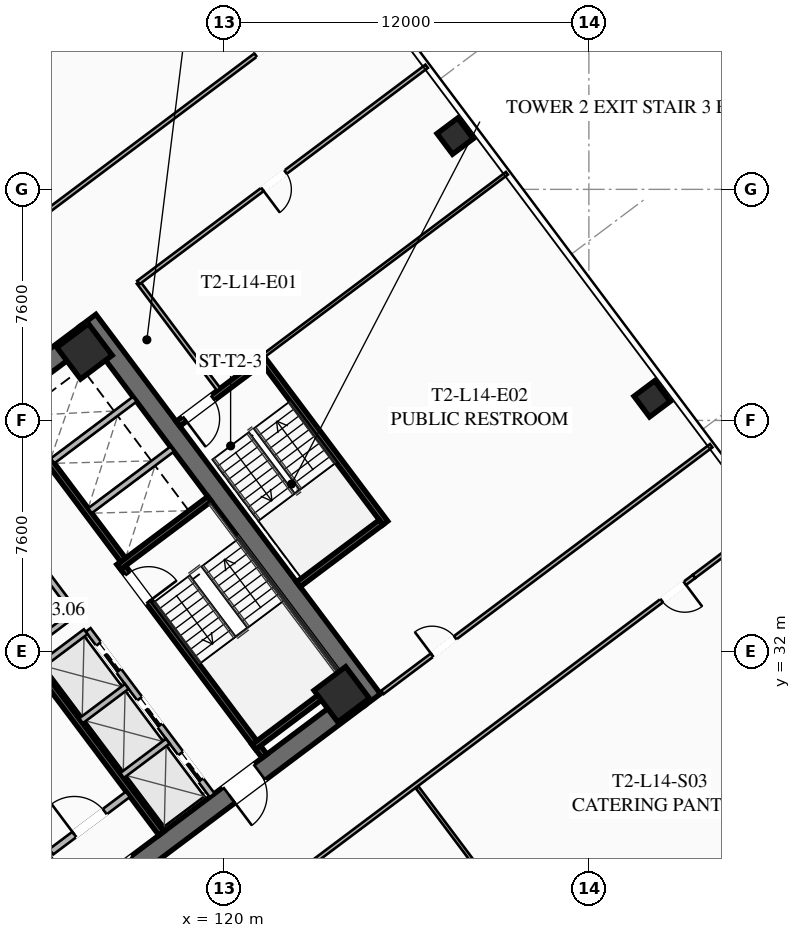
"""IFC4 building model, lengths in metres.
Left out: names, types, materials, properties, quantities, classifications, styles, units other than length and angle.
Written with IfcOpenShell. Run it as: python <this file> out.ifc"""

import sys

from ifc_helpers import new_model, si_unit, direction, frame, frame_2d, origin, origin_2d, place, context, subcontext, project, spatial, rectangle, hollow_rectangle, extrude, element, fill, save


model = new_model("IFC4")
c1 = context("Model", 3, precision=1e-05, world=origin(), true_north=direction((0.0, 1.0)))
c2 = subcontext(c1, "Body", "Model", "MODEL_VIEW")
j1 = project(units=[si_unit("LENGTHUNIT", "METRE"), si_unit("PLANEANGLEUNIT", "RADIAN")], contexts=[c1])
p1 = place(None, origin())
s1 = spatial("IfcSite", under=j1, at=p1, CompositionType="ELEMENT")
p2 = place(p1, origin())
s2 = spatial("IfcBuilding", under=s1, at=p2, CompositionType="ELEMENT")
p3 = place(p2, frame((0.0, 0.0, 56.55)))
s3 = spatial("IfcBuildingStorey", under=s2, at=p3, CompositionType="ELEMENT", Elevation=56.55)
p4 = place(p3, frame((115.524, 42.893, 0.0), z_axis=(0.0, 0.0, 1.0), x_axis=(0.600005007985, -0.799996243986, 0.0)))
e1 = element("IfcWall", 1, at=p4, inside=s3, PredefinedType="SHEAR", context=c2, shape_type="SweptSolid", body=[
    extrude(rectangle(XDim=15.6, YDim=0.65, at=frame_2d((7.8, 0.0))), origin(), (0.0, 0.0, 1.0), 3.55),
])
p5 = place(p3, frame((124.429, 30.478, 0.0), z_axis=(0.0, 0.0, 1.0), x_axis=(-0.799998028465, -0.600002628705, 0.0)))
e2 = element("IfcWall", 2, at=p5, inside=s3, PredefinedType="SHEAR", context=c2, shape_type="SweptSolid", body=[
    extrude(rectangle(XDim=14.86, YDim=0.65, at=frame_2d((7.43, 0.0))), origin(), (0.0, 0.0, 1.0), 3.55),
])
p6 = place(p5, frame((9.13, 0.0, 0.0)))
e3 = element("IfcOpeningElement", 3, at=p6, cuts=e2, PredefinedType="OPENING", context=c2, shape_type="SweptSolid", body=[
    extrude(rectangle(XDim=1.25, YDim=2.25, at=frame_2d((0.625, 1.125))), frame((0.0, 0.335, 0.0), z_axis=(0.0, -1.0, 0.0), x_axis=(1.0, 0.0, 0.0)), (0.0, 0.0, 1.0), 0.67),
])
p7 = place(p5, frame((4.08, 0.0, 0.0)))
e4 = element("IfcOpeningElement", 4, at=p7, cuts=e2, PredefinedType="OPENING", context=c2, shape_type="SweptSolid", body=[
    extrude(rectangle(XDim=1.25, YDim=2.25, at=frame_2d((0.625, 1.125))), frame((0.0, 0.335, 0.0), z_axis=(0.0, -1.0, 0.0), x_axis=(1.0, 0.0, 0.0)), (0.0, 0.0, 1.0), 0.67),
])
p8 = place(p3, frame((103.571, 33.522, 0.0), z_axis=(0.0, 0.0, 1.0), x_axis=(0.799998028465, 0.600002628705, 0.0)))
e5 = element("IfcWall", 5, at=p8, inside=s3, PredefinedType="SHEAR", context=c2, shape_type="SweptSolid", body=[
    extrude(rectangle(XDim=14.86, YDim=0.65, at=frame_2d((7.43, 0.0))), origin(), (0.0, 0.0, 1.0), 3.55),
])
p9 = place(p8, frame((4.48, 0.0, 0.0)))
e6 = element("IfcOpeningElement", 6, at=p9, cuts=e5, PredefinedType="OPENING", context=c2, shape_type="SweptSolid", body=[
    extrude(rectangle(XDim=1.25, YDim=2.25, at=frame_2d((0.625, 1.125))), frame((0.0, 0.335, 0.0), z_axis=(0.0, -1.0, 0.0), x_axis=(1.0, 0.0, 0.0)), (0.0, 0.0, 1.0), 0.67),
])
p10 = place(p8, frame((9.53, 0.0, 0.0)))
e7 = element("IfcOpeningElement", 7, at=p10, cuts=e5, PredefinedType="OPENING", context=c2, shape_type="SweptSolid", body=[
    extrude(rectangle(XDim=1.25, YDim=2.25, at=frame_2d((0.625, 1.125))), frame((0.0, 0.335, 0.0), z_axis=(0.0, -1.0, 0.0), x_axis=(1.0, 0.0, 0.0)), (0.0, 0.0, 1.0), 0.67),
])
for number, where, z_axis, x_axis in (
    (8, (123.87, 30.59, 0.0), (0.0, 0.0, 1.0), (0.8, 0.6, 0.0)),
    (9, (115.41, 41.87, 0.0), (0.0, 0.0, 1.0), (0.8, 0.6, 0.0)),
):
    element("IfcColumn", number, at=place(p3, frame(where, z_axis=z_axis, x_axis=x_axis)), inside=s3, PredefinedType="COLUMN", context=c2, shape_type="SweptSolid", body=[
        extrude(hollow_rectangle(XDim=1.3, YDim=1.3, WallThickness=0.05, at=origin_2d()), origin(), (0.0, 0.0, 1.0), 3.35),
    ])
for number, where, z_axis, x_axis in (
    (10, (134.08, 40.31, 0.0), (0.0, 0.0, 1.0), (0.8, 0.6, 0.0)),
    (11, (127.6, 48.95, 0.0), (0.0, 0.0, 1.0), (0.8, 0.6, 0.0)),
):
    element("IfcColumn", number, at=place(p3, frame(where, z_axis=z_axis, x_axis=x_axis)), inside=s3, PredefinedType="COLUMN", context=c2, shape_type="SweptSolid", body=[
        extrude(hollow_rectangle(XDim=0.85, YDim=0.85, WallThickness=0.035, at=origin_2d()), origin(), (0.0, 0.0, 1.0), 3.35),
    ])
p11 = place(p3, frame((116.56, 34.92, 0.0), z_axis=(0.0, 0.0, 1.0), x_axis=(0.600009827119, -0.799992629566, 0.0)))
e12 = element("IfcWall", 12, at=p11, inside=s3, PredefinedType="SHEAR", context=c2, shape_type="SweptSolid", body=[
    extrude(rectangle(XDim=7.95, YDim=0.2, at=frame_2d((3.975, 0.0))), origin(), (0.0, 0.0, 1.0), 3.35),
])
p12 = place(p11, frame((0.45, 0.0, 0.0)))
e13 = element("IfcOpeningElement", 13, at=p12, cuts=e12, PredefinedType="OPENING", context=c2, shape_type="SweptSolid", body=[
    extrude(rectangle(XDim=1.15, YDim=2.2, at=frame_2d((0.575, 1.1))), frame((0.0, 0.11, 0.0), z_axis=(0.0, -1.0, 0.0), x_axis=(1.0, 0.0, 0.0)), (0.0, 0.0, 1.0), 0.22),
])
for number, where, z_axis, x_axis in (
    (14, (116.54, 34.78, 0.0), (0.0, 0.0, 1.0), (0.8, 0.6, 0.0)),
    (15, (120.98, 28.86, 0.0), (0.0, 0.0, 1.0), (0.8, 0.6, 0.0)),
):
    element("IfcWall", number, at=place(p3, frame(where, z_axis=z_axis, x_axis=x_axis)), inside=s3, PredefinedType="SHEAR", context=c2, shape_type="SweptSolid", body=[
        extrude(rectangle(XDim=3.73, YDim=0.2, at=frame_2d((1.865, 0.0))), origin(), (0.0, 0.0, 1.0), 3.35),
    ])
p13 = place(p3, frame((117.938, 26.016, 0.0), z_axis=(0.0, 0.0, 1.0), x_axis=(-0.600005463273, 0.799995902516, 0.0)))
e16 = element("IfcWall", 16, at=p13, inside=s3, PredefinedType="SHEAR", context=c2, shape_type="SweptSolid", body=[
    extrude(rectangle(XDim=14.3, YDim=0.2, at=frame_2d((7.15, 0.0))), origin(), (0.0, 0.0, 1.0), 3.35),
])
p14 = place(p3, frame((114.316, 25.412, 0.0), z_axis=(0.0, 0.0, 1.0), x_axis=(0.800018601094, 0.59997519774, 0.0)))
e17 = element("IfcWall", 17, at=p14, inside=s3, PredefinedType="SOLIDWALL", context=c2, shape_type="SweptSolid", body=[
    extrude(rectangle(XDim=3.15, YDim=0.22, at=frame_2d((1.575, 0.0))), origin(), (0.0, 0.0, 1.0), 2.703),
])
p15 = place(p14, frame((0.95, 0.0, 0.0)))
e18 = element("IfcOpeningElement", 18, at=p15, cuts=e17, PredefinedType="OPENING", context=c2, shape_type="SweptSolid", body=[
    extrude(rectangle(XDim=1.25, YDim=2.25, at=frame_2d((0.625, 1.125))), frame((0.0, 0.12, 0.0), z_axis=(0.0, -1.0, 0.0), x_axis=(1.0, 0.0, 0.0)), (0.0, 0.0, 1.0), 0.24),
])
p16 = place(p3, frame((115.13, 23.91, 0.0), z_axis=(0.0, 0.0, 1.0), x_axis=(-0.599975393228, 0.800018454488, 0.0)))
e19 = element("IfcWall", 19, at=p16, inside=s3, PredefinedType="SHEAR", context=c2, shape_type="SweptSolid", body=[
    extrude(rectangle(XDim=6.35, YDim=0.2, at=frame_2d((3.175, 0.0))), origin(), (0.0, 0.0, 1.0), 3.35),
])
p17 = place(p16, frame((4.775, 0.0, 0.0)))
e20 = element("IfcOpeningElement", 20, at=p17, cuts=e19, PredefinedType="OPENING", context=c2, shape_type="SweptSolid", body=[
    extrude(rectangle(XDim=1.3, YDim=2.25, at=frame_2d((0.65, 1.125))), frame((0.0, 0.11, 0.0), z_axis=(0.0, -1.0, 0.0), x_axis=(1.0, 0.0, 0.0)), (0.0, 0.0, 1.0), 0.22),
])
p18 = place(p16, frame((2.775, 0.0, 0.0)))
e21 = element("IfcOpeningElement", 21, at=p18, cuts=e19, PredefinedType="OPENING", context=c2, shape_type="SweptSolid", body=[
    extrude(rectangle(XDim=1.3, YDim=2.25, at=frame_2d((0.65, 1.125))), frame((0.0, 0.11, 0.0), z_axis=(0.0, -1.0, 0.0), x_axis=(1.0, 0.0, 0.0)), (0.0, 0.0, 1.0), 0.22),
])
p19 = place(p16, frame((0.575, 0.0, 0.0)))
e22 = element("IfcOpeningElement", 22, at=p19, cuts=e19, PredefinedType="OPENING", context=c2, shape_type="SweptSolid", body=[
    extrude(rectangle(XDim=1.3, YDim=2.25, at=frame_2d((0.65, 1.125))), frame((0.0, 0.11, 0.0), z_axis=(0.0, -1.0, 0.0), x_axis=(1.0, 0.0, 0.0)), (0.0, 0.0, 1.0), 0.22),
])
p20 = place(p3, frame((112.87, 40.09, 0.0), z_axis=(0.0, 0.0, 1.0), x_axis=(0.599975393228, -0.800018454488, 0.0)))
e23 = element("IfcWall", 23, at=p20, inside=s3, PredefinedType="SHEAR", context=c2, shape_type="SweptSolid", body=[
    extrude(rectangle(XDim=6.35, YDim=0.2, at=frame_2d((3.175, 0.0))), origin(), (0.0, 0.0, 1.0), 3.35),
])
for number, where, z_axis, x_axis in (
    (24, (115.59, 36.63, 0.0), (0.0, 0.0, 1.0), (0.8, 0.6, 0.0)),
    (25, (114.36, 38.27, 0.0), (0.0, 0.0, 1.0), (0.8, 0.6, 0.0)),
):
    element("IfcWall", number, at=place(p3, frame(where, z_axis=z_axis, x_axis=x_axis)), inside=s3, PredefinedType="SOLIDWALL", context=c2, shape_type="SweptSolid", body=[
        extrude(rectangle(XDim=3.38, YDim=0.2, at=frame_2d((1.69, 0.0))), origin(), (0.0, 0.0, 1.0), 3.35),
    ])
p21 = place(p3, frame((119.61, 27.27, 0.0), z_axis=(0.0, 0.0, 1.0), x_axis=(-0.600011488909, 0.79999138319, 0.0)))
e26 = element("IfcWall", 26, at=p21, inside=s3, PredefinedType="SOLIDWALL", context=c2, shape_type="SweptSolid", body=[
    extrude(rectangle(XDim=6.8, YDim=0.2, at=frame_2d((3.4, 0.0))), origin(), (0.0, 0.0, 1.0), 3.35),
])
p22 = place(p21, frame((0.625, 0.0, 0.0)))
e27 = element("IfcOpeningElement", 27, at=p22, cuts=e26, PredefinedType="OPENING", context=c2, shape_type="SweptSolid", body=[
    extrude(rectangle(XDim=1.1, YDim=2.2, at=frame_2d((0.55, 1.1))), frame((0.0, 0.11, 0.0), z_axis=(0.0, -1.0, 0.0), x_axis=(1.0, 0.0, 0.0)), (0.0, 0.0, 1.0), 0.22),
])
p23 = place(p21, frame((2.875, 0.0, 0.0)))
e28 = element("IfcOpeningElement", 28, at=p23, cuts=e26, PredefinedType="OPENING", context=c2, shape_type="SweptSolid", body=[
    extrude(rectangle(XDim=1.1, YDim=2.2, at=frame_2d((0.55, 1.1))), frame((0.0, 0.11, 0.0), z_axis=(0.0, -1.0, 0.0), x_axis=(1.0, 0.0, 0.0)), (0.0, 0.0, 1.0), 0.22),
])
p24 = place(p21, frame((5.125, 0.0, 0.0)))
e29 = element("IfcOpeningElement", 29, at=p24, cuts=e26, PredefinedType="OPENING", context=c2, shape_type="SweptSolid", body=[
    extrude(rectangle(XDim=1.1, YDim=2.2, at=frame_2d((0.55, 1.1))), frame((0.0, 0.11, 0.0), z_axis=(0.0, -1.0, 0.0), x_axis=(1.0, 0.0, 0.0)), (0.0, 0.0, 1.0), 0.22),
])
p25 = place(p3, frame((116.646, 27.922, 0.0), z_axis=(0.0, 0.0, 1.0), x_axis=(0.8, 0.6, 0.0)))
e30 = element("IfcWall", 30, at=p25, inside=s3, PredefinedType="SOLIDWALL", context=c2, shape_type="SweptSolid", body=[
    extrude(rectangle(XDim=1.88, YDim=0.2, at=frame_2d((0.94, 0.0))), origin(), (0.0, 0.0, 1.0), 3.35),
])
p26 = place(p3, frame((115.296, 29.722, 0.0), z_axis=(0.0, 0.0, 1.0), x_axis=(0.799984418148, 0.600020775241, 0.0)))
e31 = element("IfcWall", 31, at=p26, inside=s3, PredefinedType="SOLIDWALL", context=c2, shape_type="SweptSolid", body=[
    extrude(rectangle(XDim=1.88, YDim=0.2, at=frame_2d((0.94, 0.0))), origin(), (0.0, 0.0, 1.0), 3.35),
])
p27 = place(p3, frame((113.946, 31.522, 0.0), z_axis=(0.0, 0.0, 1.0), x_axis=(0.8, 0.6, 0.0)))
e32 = element("IfcWall", 32, at=p27, inside=s3, PredefinedType="SOLIDWALL", context=c2, shape_type="SweptSolid", body=[
    extrude(rectangle(XDim=1.88, YDim=0.2, at=frame_2d((0.94, 0.0))), origin(), (0.0, 0.0, 1.0), 3.35),
])
p28 = place(p3, frame((115.11, 33.27, 0.0), z_axis=(0.0, 0.0, 1.0), x_axis=(-0.600011488909, 0.79999138319, 0.0)))
e33 = element("IfcWall", 33, at=p28, inside=s3, PredefinedType="SOLIDWALL", context=c2, shape_type="SweptSolid", body=[
    extrude(rectangle(XDim=6.8, YDim=0.2, at=frame_2d((3.4, 0.0))), origin(), (0.0, 0.0, 1.0), 3.35),
])
p29 = place(p3, frame((113.526, 32.082, 0.0), z_axis=(0.0, 0.0, 1.0), x_axis=(0.800046745961, 0.599937666993, 0.0)))
e34 = element("IfcWall", 34, at=p29, inside=s3, PredefinedType="SOLIDWALL", context=c2, shape_type="SweptSolid", body=[
    extrude(rectangle(XDim=1.88, YDim=0.2, at=frame_2d((0.94, 0.0))), origin(), (0.0, 0.0, 1.0), 3.35),
])
p30 = place(p3, frame((125.304, 36.228, 0.0), z_axis=(0.0, 0.0, 1.0), x_axis=(-0.59998851072, 0.800008616831, 0.0)))
e35 = element("IfcWall", 35, at=p30, inside=s3, PredefinedType="SHEAR", context=c2, shape_type="SweptSolid", body=[
    extrude(rectangle(XDim=6.8, YDim=0.2, at=frame_2d((3.4, 0.0))), origin(), (0.0, 0.0, 1.0), 3.35),
])
p31 = place(p3, frame((121.204, 41.528, 0.0), z_axis=(0.0, 0.0, 1.0), x_axis=(-0.800017232136, -0.599977023131, 0.0)))
e36 = element("IfcWall", 36, at=p31, inside=s3, PredefinedType="SHEAR", context=c2, shape_type="SweptSolid", body=[
    extrude(rectangle(XDim=3.4, YDim=0.2, at=frame_2d((1.7, 0.0))), origin(), (0.0, 0.0, 1.0), 3.35),
])
p32 = place(p31, frame((1.975, 0.0, 0.0)))
e37 = element("IfcOpeningElement", 37, at=p32, cuts=e36, PredefinedType="OPENING", context=c2, shape_type="SweptSolid", body=[
    extrude(rectangle(XDim=1.15, YDim=2.2, at=frame_2d((0.575, 1.1))), frame((0.0, 0.11, 0.0), z_axis=(0.0, -1.0, 0.0), x_axis=(1.0, 0.0, 0.0)), (0.0, 0.0, 1.0), 0.22),
])
p33 = place(p3, frame((122.444, 34.208, 0.0), z_axis=(0.0, 0.0, 1.0), x_axis=(0.79999138319, 0.600011488909, 0.0)))
e38 = element("IfcWall", 38, at=p33, inside=s3, PredefinedType="SHEAR", context=c2, shape_type="SweptSolid", body=[
    extrude(rectangle(XDim=3.4, YDim=0.2, at=frame_2d((1.7, 0.0))), origin(), (0.0, 0.0, 1.0), 3.35),
])
p34 = place(p3, frame((119.824, 40.618, 0.0), z_axis=(0.0, 0.0, 1.0), x_axis=(-0.599982243973, 0.800013316712, 0.0)))
e39 = element("IfcWall", 39, at=p34, inside=s3, PredefinedType="PARTITIONING", context=c2, shape_type="SweptSolid", body=[
    extrude(rectangle(XDim=4.4, YDim=0.135, at=frame_2d((2.2, 0.0))), origin(), (0.0, 0.0, 1.0), 2.703),
])
p35 = place(p3, frame((98.174, 34.468, 0.0), z_axis=(0.0, 0.0, 1.0), x_axis=(0.800000982127, 0.599998690494, 0.0)))
e40 = element("IfcWall", 40, at=p35, inside=s3, PredefinedType="PARTITIONING", context=c2, shape_type="SweptSolid", body=[
    extrude(rectangle(XDim=29.83, YDim=0.135, at=frame_2d((14.915, 0.0))), origin(), (0.0, 0.0, 1.0), 2.703),
])
p36 = place(p35, frame((0.3, 0.0, 0.0)))
e41 = element("IfcOpeningElement", 41, at=p36, cuts=e40, PredefinedType="OPENING", context=c2, shape_type="SweptSolid", body=[
    extrude(rectangle(XDim=0.95, YDim=2.05, at=frame_2d((0.475, 1.025))), frame((0.0, 0.077, 0.0), z_axis=(0.0, -1.0, 0.0), x_axis=(1.0, 0.0, 0.0)), (0.0, 0.0, 1.0), 0.155),
])
p37 = place(p35, frame((10.913, 0.0, 0.0)))
e42 = element("IfcOpeningElement", 42, at=p37, cuts=e40, PredefinedType="OPENING", context=c2, shape_type="SweptSolid", body=[
    extrude(rectangle(XDim=0.95, YDim=2.05, at=frame_2d((0.475, 1.025))), frame((0.0, 0.077, 0.0), z_axis=(0.0, -1.0, 0.0), x_axis=(1.0, 0.0, 0.0)), (0.0, 0.0, 1.0), 0.155),
])
p38 = place(p35, frame((28.58, 0.0, 0.0)))
e43 = element("IfcOpeningElement", 43, at=p38, cuts=e40, PredefinedType="OPENING", context=c2, shape_type="SweptSolid", body=[
    extrude(rectangle(XDim=0.95, YDim=2.05, at=frame_2d((0.475, 1.025))), frame((0.0, 0.077, 0.0), z_axis=(0.0, -1.0, 0.0), x_axis=(1.0, 0.0, 0.0)), (0.0, 0.0, 1.0), 0.155),
])
p39 = place(p3, frame((135.46, 34.47, 0.0), z_axis=(0.0, 0.0, 1.0), x_axis=(-0.800000982127, -0.599998690494, 0.0)))
e44 = element("IfcWall", 44, at=p39, inside=s3, PredefinedType="PARTITIONING", context=c2, shape_type="SweptSolid", body=[
    extrude(rectangle(XDim=29.83, YDim=0.135, at=frame_2d((14.915, 0.0))), origin(), (0.0, 0.0, 1.0), 2.703),
])
p40 = place(p39, frame((28.5, 0.0, 0.0)))
e45 = element("IfcOpeningElement", 45, at=p40, cuts=e44, PredefinedType="OPENING", context=c2, shape_type="SweptSolid", body=[
    extrude(rectangle(XDim=0.95, YDim=2.05, at=frame_2d((0.475, 1.025))), frame((0.0, 0.077, 0.0), z_axis=(0.0, -1.0, 0.0), x_axis=(1.0, 0.0, 0.0)), (0.0, 0.0, 1.0), 0.155),
])
p41 = place(p39, frame((17.938, 0.0, 0.0)))
e46 = element("IfcOpeningElement", 46, at=p41, cuts=e44, PredefinedType="OPENING", context=c2, shape_type="SweptSolid", body=[
    extrude(rectangle(XDim=0.95, YDim=2.05, at=frame_2d((0.475, 1.025))), frame((0.0, 0.077, 0.0), z_axis=(0.0, -1.0, 0.0), x_axis=(1.0, 0.0, 0.0)), (0.0, 0.0, 1.0), 0.155),
])
p42 = place(p39, frame((0.38, 0.0, 0.0)))
e47 = element("IfcOpeningElement", 47, at=p42, cuts=e44, PredefinedType="OPENING", context=c2, shape_type="SweptSolid", body=[
    extrude(rectangle(XDim=0.95, YDim=2.05, at=frame_2d((0.475, 1.025))), frame((0.0, 0.077, 0.0), z_axis=(0.0, -1.0, 0.0), x_axis=(1.0, 0.0, 0.0)), (0.0, 0.0, 1.0), 0.155),
])
p43 = place(p3, frame((135.46, 34.47, 0.0), z_axis=(0.0, 0.0, 1.0), x_axis=(0.799990331366, 0.600012891296, 0.0)))
e48 = element("IfcWall", 48, at=p43, inside=s3, PredefinedType="PARTITIONING", context=c2, shape_type="SweptSolid", body=[
    extrude(rectangle(XDim=3.03, YDim=0.135, at=frame_2d((1.515, 0.0))), origin(), (0.0, 0.0, 1.0), 2.703),
])
p44 = place(p3, frame((132.768, 18.976, 0.0), z_axis=(0.0, 0.0, 1.0), x_axis=(-0.600018253432, 0.799986309601, 0.0)))
e49 = element("IfcWall", 49, at=p44, inside=s3, PredefinedType="PARTITIONING", context=c2, shape_type="SweptSolid", body=[
    extrude(rectangle(XDim=10.7, YDim=0.11, at=frame_2d((5.35, 0.0))), origin(), (0.0, 0.0, 1.0), 2.703),
])
p45 = place(p3, frame((126.664, 51.248, 0.0), z_axis=(0.0, 0.0, 1.0), x_axis=(-0.799995055373, -0.600006592779, 0.0)))
e50 = element("IfcWall", 50, at=p45, inside=s3, PredefinedType="PARTITIONING", context=c2, shape_type="SweptSolid", body=[
    extrude(rectangle(XDim=11.85, YDim=0.135, at=frame_2d((5.925, 0.0))), origin(), (0.0, 0.0, 1.0), 2.703),
])
p46 = place(p45, frame((5.8, 0.0, 0.0)))
e51 = element("IfcOpeningElement", 51, at=p46, cuts=e50, PredefinedType="OPENING", context=c2, shape_type="SweptSolid", body=[
    extrude(rectangle(XDim=0.95, YDim=2.05, at=frame_2d((0.475, 1.025))), frame((0.0, 0.077, 0.0), z_axis=(0.0, -1.0, 0.0), x_axis=(1.0, 0.0, 0.0)), (0.0, 0.0, 1.0), 0.155),
])
p47 = place(p3, frame((125.208, 30.656, 0.0), z_axis=(0.0, 0.0, 1.0), x_axis=(0.799995666112, 0.600005778473, 0.0)))
e52 = element("IfcWall", 52, at=p47, inside=s3, PredefinedType="PARTITIONING", context=c2, shape_type="SweptSolid", body=[
    extrude(rectangle(XDim=13.52, YDim=0.135, at=frame_2d((6.76, 0.0))), origin(), (0.0, 0.0, 1.0), 2.703),
])
p48 = place(p47, frame((2.045, 0.0, 0.0)))
e53 = element("IfcOpeningElement", 53, at=p48, cuts=e52, PredefinedType="OPENING", context=c2, shape_type="SweptSolid", body=[
    extrude(rectangle(XDim=0.95, YDim=2.05, at=frame_2d((0.475, 1.025))), frame((0.0, 0.077, 0.0), z_axis=(0.0, -1.0, 0.0), x_axis=(1.0, 0.0, 0.0)), (0.0, 0.0, 1.0), 0.155),
])
p49 = place(p3, frame((129.304, 47.728, 0.0), z_axis=(0.0, 0.0, 1.0), x_axis=(-0.8, -0.6, 0.0)))
e54 = element("IfcWall", 54, at=p49, inside=s3, PredefinedType="PARTITIONING", context=c2, shape_type="SweptSolid", body=[
    extrude(rectangle(XDim=10.0, YDim=0.11, at=frame_2d((5.0, 0.0))), origin(), (0.0, 0.0, 1.0), 2.703),
])
p50 = place(p7, origin())
e55 = element("IfcDoor", 55, at=p50, inside=s3, OperationType="SINGLE_SWING_RIGHT", PredefinedType="DOOR", context=c2, shape_type="SweptSolid", body=[
    extrude(rectangle(XDim=1.25, YDim=2.25, at=frame_2d((0.625, 1.125))), frame((0.0, 0.025, 0.0), z_axis=(0.0, -1.0, 0.0), x_axis=(1.0, 0.0, 0.0)), (0.0, 0.0, 1.0), 0.05),
])
fill(e4, e55)
p51 = place(p12, origin())
e56 = element("IfcDoor", 56, at=p51, inside=s3, OperationType="SINGLE_SWING_RIGHT", PredefinedType="DOOR", context=c2, shape_type="SweptSolid", body=[
    extrude(rectangle(XDim=1.15, YDim=2.2, at=frame_2d((0.575, 1.1))), frame((0.0, 0.025, 0.0), z_axis=(0.0, -1.0, 0.0), x_axis=(1.0, 0.0, 0.0)), (0.0, 0.0, 1.0), 0.05),
])
fill(e13, e56)
p52 = place(p15, origin())
e57 = element("IfcDoor", 57, at=p52, inside=s3, OperationType="SINGLE_SWING_LEFT", PredefinedType="DOOR", context=c2, shape_type="SweptSolid", body=[
    extrude(rectangle(XDim=1.25, YDim=2.25, at=frame_2d((0.625, 1.125))), frame((0.0, 0.025, 0.0), z_axis=(0.0, -1.0, 0.0), x_axis=(1.0, 0.0, 0.0)), (0.0, 0.0, 1.0), 0.05),
])
fill(e18, e57)
p53 = place(p32, origin())
e58 = element("IfcDoor", 58, at=p53, inside=s3, OperationType="SINGLE_SWING_RIGHT", PredefinedType="DOOR", context=c2, shape_type="SweptSolid", body=[
    extrude(rectangle(XDim=1.15, YDim=2.2, at=frame_2d((0.575, 1.1))), frame((0.0, 0.025, 0.0), z_axis=(0.0, -1.0, 0.0), x_axis=(1.0, 0.0, 0.0)), (0.0, 0.0, 1.0), 0.05),
])
fill(e37, e58)
p54 = place(p38, origin())
e59 = element("IfcDoor", 59, at=p54, inside=s3, OperationType="SINGLE_SWING_RIGHT", PredefinedType="DOOR", context=c2, shape_type="SweptSolid", body=[
    extrude(rectangle(XDim=0.95, YDim=2.05, at=frame_2d((0.475, 1.025))), frame((0.0, 0.025, 0.0), z_axis=(0.0, -1.0, 0.0), x_axis=(1.0, 0.0, 0.0)), (0.0, 0.0, 1.0), 0.05),
])
fill(e43, e59)
p55 = place(p42, origin())
e60 = element("IfcDoor", 60, at=p55, inside=s3, OperationType="SINGLE_SWING_LEFT", PredefinedType="DOOR", context=c2, shape_type="SweptSolid", body=[
    extrude(rectangle(XDim=0.95, YDim=2.05, at=frame_2d((0.475, 1.025))), frame((0.0, 0.025, 0.0), z_axis=(0.0, -1.0, 0.0), x_axis=(1.0, 0.0, 0.0)), (0.0, 0.0, 1.0), 0.05),
])
fill(e47, e60)
p56 = place(p46, origin())
e61 = element("IfcDoor", 61, at=p56, inside=s3, OperationType="SINGLE_SWING_RIGHT", PredefinedType="DOOR", context=c2, shape_type="SweptSolid", body=[
    extrude(rectangle(XDim=0.95, YDim=2.05, at=frame_2d((0.475, 1.025))), frame((0.0, 0.025, 0.0), z_axis=(0.0, -1.0, 0.0), x_axis=(1.0, 0.0, 0.0)), (0.0, 0.0, 1.0), 0.05),
])
fill(e51, e61)
p57 = place(p48, origin())
e62 = element("IfcDoor", 62, at=p57, inside=s3, OperationType="SINGLE_SWING_LEFT", PredefinedType="DOOR", context=c2, shape_type="SweptSolid", body=[
    extrude(rectangle(XDim=0.95, YDim=2.05, at=frame_2d((0.475, 1.025))), frame((0.0, 0.025, 0.0), z_axis=(0.0, -1.0, 0.0), x_axis=(1.0, 0.0, 0.0)), (0.0, 0.0, 1.0), 0.05),
])
fill(e53, e62)
p58 = place(p19, origin())
e63 = element("IfcDoor", 63, at=p58, inside=s3, OperationType="SLIDING_TO_LEFT", PredefinedType="DOOR", context=c2, shape_type="SweptSolid", body=[
    extrude(rectangle(XDim=1.3, YDim=2.25, at=frame_2d((0.65, 1.125))), frame((0.0, 0.025, 0.0), z_axis=(0.0, -1.0, 0.0), x_axis=(1.0, 0.0, 0.0)), (0.0, 0.0, 1.0), 0.05),
])
fill(e22, e63)
p59 = place(p22, origin())
e64 = element("IfcDoor", 64, at=p59, inside=s3, OperationType="SLIDING_TO_LEFT", PredefinedType="DOOR", context=c2, shape_type="SweptSolid", body=[
    extrude(rectangle(XDim=1.1, YDim=2.2, at=frame_2d((0.55, 1.1))), frame((0.0, 0.025, 0.0), z_axis=(0.0, -1.0, 0.0), x_axis=(1.0, 0.0, 0.0)), (0.0, 0.0, 1.0), 0.05),
])
fill(e27, e64)
p60 = place(p23, origin())
e65 = element("IfcDoor", 65, at=p60, inside=s3, OperationType="SLIDING_TO_LEFT", PredefinedType="DOOR", context=c2, shape_type="SweptSolid", body=[
    extrude(rectangle(XDim=1.1, YDim=2.2, at=frame_2d((0.55, 1.1))), frame((0.0, 0.025, 0.0), z_axis=(0.0, -1.0, 0.0), x_axis=(1.0, 0.0, 0.0)), (0.0, 0.0, 1.0), 0.05),
])
fill(e28, e65)
p61 = place(p24, origin())
e66 = element("IfcDoor", 66, at=p61, inside=s3, OperationType="SLIDING_TO_LEFT", PredefinedType="DOOR", context=c2, shape_type="SweptSolid", body=[
    extrude(rectangle(XDim=1.1, YDim=2.2, at=frame_2d((0.55, 1.1))), frame((0.0, 0.025, 0.0), z_axis=(0.0, -1.0, 0.0), x_axis=(1.0, 0.0, 0.0)), (0.0, 0.0, 1.0), 0.05),
])
fill(e29, e66)
save(model, sys.argv[1])
